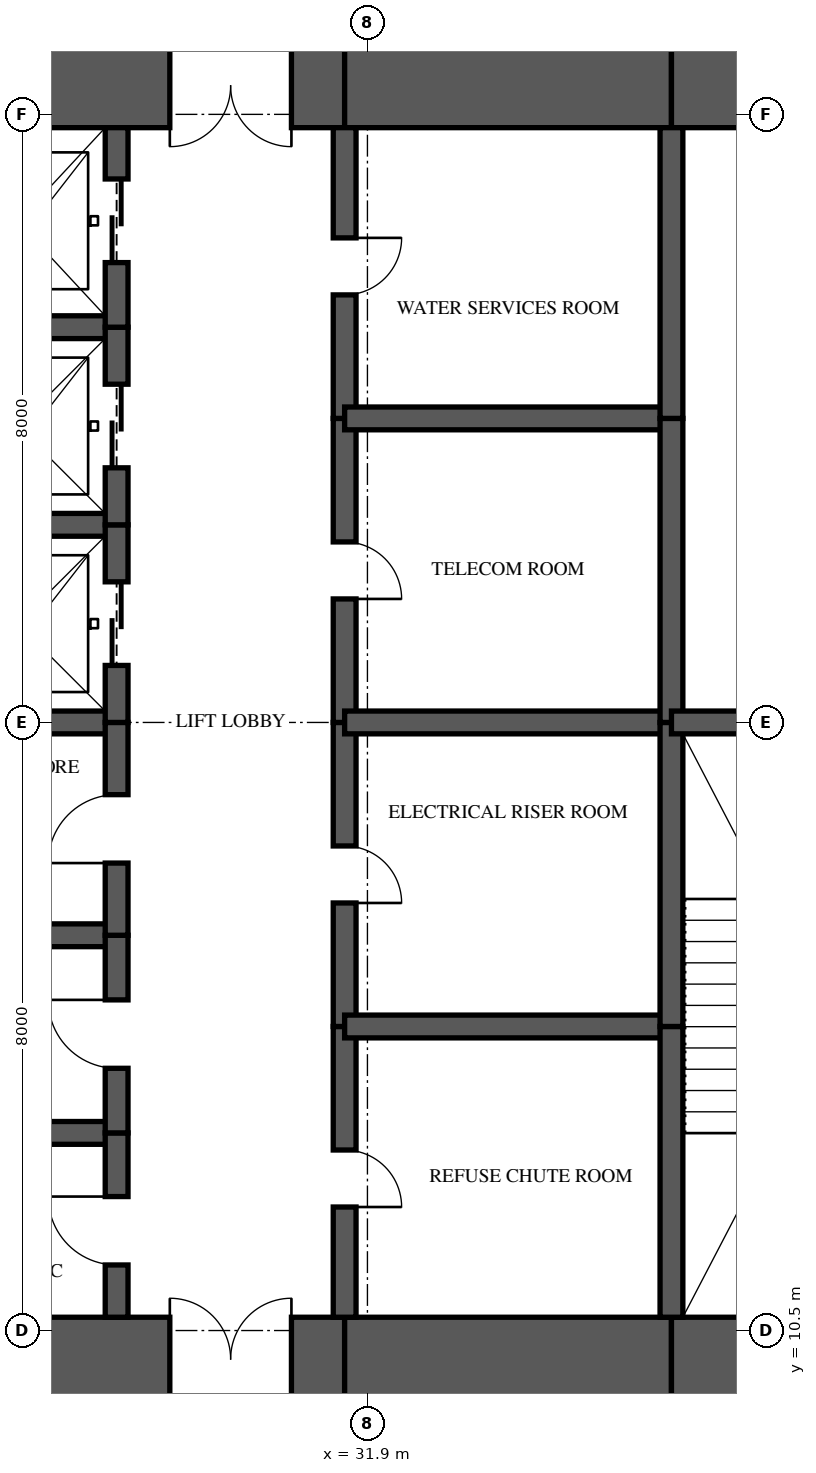
"""IFC4 building model, lengths in metres.
Left out: names, types, materials, properties, quantities, classifications, styles, units other than length and angle.
Written with IfcOpenShell. Run it as: python <this file> out.ifc"""

import sys

from ifc_helpers import new_model, si_unit, direction, frame, frame_2d, origin, place, context, subcontext, project, spatial, rectangle, extrude, element, fill, save


model = new_model("IFC4")
c1 = context("Model", 3, precision=1e-05, world=origin(), true_north=direction((0.0, 1.0)))
c2 = subcontext(c1, "Body", "Model", "MODEL_VIEW")
j1 = project(units=[si_unit("LENGTHUNIT", "METRE"), si_unit("PLANEANGLEUNIT", "RADIAN")], contexts=[c1])
p1 = place(None, origin())
s1 = spatial("IfcSite", under=j1, at=p1, CompositionType="ELEMENT")
p2 = place(p1, origin())
s2 = spatial("IfcBuilding", under=s1, at=p2, CompositionType="ELEMENT")
p3 = place(p2, frame((0.0, 0.0, 256.45)))
s3 = spatial("IfcBuildingStorey", under=s2, at=p3, CompositionType="ELEMENT", Elevation=256.45)
p4 = place(p3, frame((26.0, 10.125, 0.0), z_axis=(0.0, 0.0, 1.0), x_axis=(1.0, 0.0, 0.0)))
e1 = element("IfcWall", 1, at=p4, inside=s3, PredefinedType="SHEAR", context=c2, shape_type="SweptSolid", body=[
    extrude(rectangle(XDim=5.6, YDim=1.1, at=frame_2d((2.8, 0.0))), origin(), (0.0, 0.0, 1.0), 3.5),
])
p5 = place(p4, frame((3.3, 0.0, 0.0)))
e2 = element("IfcOpeningElement", 2, at=p5, cuts=e1, PredefinedType="OPENING", context=c2, shape_type="SweptSolid", body=[
    extrude(rectangle(XDim=1.6, YDim=2.1, at=frame_2d((0.8, 1.05))), frame((0.0, 0.56, 0.0), z_axis=(0.0, -1.0, 0.0), x_axis=(1.0, 0.0, 0.0)), (0.0, 0.0, 1.0), 1.12),
])
p6 = place(p3, frame((31.6, 10.125, 0.0), z_axis=(0.0, 0.0, 1.0), x_axis=(1.0, 0.0, 0.0)))
e3 = element("IfcWall", 3, at=p6, inside=s3, PredefinedType="SHEAR", context=c2, shape_type="SweptSolid", body=[
    extrude(rectangle(XDim=4.3, YDim=1.1, at=frame_2d((2.15, 0.0))), origin(), (0.0, 0.0, 1.0), 3.5),
])
p7 = place(p3, frame((35.9, 10.125, 0.0), z_axis=(0.0, 0.0, 1.0), x_axis=(1.0, 0.0, 0.0)))
e4 = element("IfcWall", 4, at=p7, inside=s3, PredefinedType="SHEAR", context=c2, shape_type="SweptSolid", body=[
    extrude(rectangle(XDim=8.175, YDim=1.1, at=frame_2d((4.087, 0.0))), origin(), (0.0, 0.0, 1.0), 3.5),
])
p8 = place(p7, frame((2.7, 0.0, 0.0)))
e5 = element("IfcOpeningElement", 5, at=p8, cuts=e4, PredefinedType="OPENING", context=c2, shape_type="SweptSolid", body=[
    extrude(rectangle(XDim=1.0, YDim=2.1, at=frame_2d((0.5, 1.05))), frame((0.0, 0.56, 0.0), z_axis=(0.0, -1.0, 0.0), x_axis=(1.0, 0.0, 0.0)), (0.0, 0.0, 1.0), 1.12),
])
p9 = place(p3, frame((44.075, 26.875, 0.0), z_axis=(0.0, 0.0, 1.0), x_axis=(-1.0, 0.0, 0.0)))
e6 = element("IfcWall", 6, at=p9, inside=s3, PredefinedType="SHEAR", context=c2, shape_type="SweptSolid", body=[
    extrude(rectangle(XDim=8.175, YDim=1.1, at=frame_2d((4.087, 0.0))), origin(), (0.0, 0.0, 1.0), 3.5),
])
p10 = place(p9, frame((5.575, 0.0, 0.0)))
e7 = element("IfcOpeningElement", 7, at=p10, cuts=e6, PredefinedType="OPENING", context=c2, shape_type="SweptSolid", body=[
    extrude(rectangle(XDim=0.9, YDim=2.1, at=frame_2d((0.45, 1.05))), frame((0.0, 0.56, 0.0), z_axis=(0.0, -1.0, 0.0), x_axis=(1.0, 0.0, 0.0)), (0.0, 0.0, 1.0), 1.12),
])
p11 = place(p3, frame((35.9, 26.875, 0.0), z_axis=(0.0, 0.0, 1.0), x_axis=(-1.0, 0.0, 0.0)))
e8 = element("IfcWall", 8, at=p11, inside=s3, PredefinedType="SHEAR", context=c2, shape_type="SweptSolid", body=[
    extrude(rectangle(XDim=4.3, YDim=1.1, at=frame_2d((2.15, 0.0))), origin(), (0.0, 0.0, 1.0), 3.5),
])
p12 = place(p3, frame((31.6, 26.875, 0.0), z_axis=(0.0, 0.0, 1.0), x_axis=(-1.0, 0.0, 0.0)))
e9 = element("IfcWall", 9, at=p12, inside=s3, PredefinedType="SHEAR", context=c2, shape_type="SweptSolid", body=[
    extrude(rectangle(XDim=5.6, YDim=1.1, at=frame_2d((2.8, 0.0))), origin(), (0.0, 0.0, 1.0), 3.5),
])
p13 = place(p12, frame((0.7, 0.0, 0.0)))
e10 = element("IfcOpeningElement", 10, at=p13, cuts=e9, PredefinedType="OPENING", context=c2, shape_type="SweptSolid", body=[
    extrude(rectangle(XDim=1.6, YDim=2.1, at=frame_2d((0.8, 1.05))), frame((0.0, 0.56, 0.0), z_axis=(0.0, -1.0, 0.0), x_axis=(1.0, 0.0, 0.0)), (0.0, 0.0, 1.0), 1.12),
])
p14 = place(p3, frame((28.6, 10.675, 0.0), z_axis=(0.0, 0.0, 1.0), x_axis=(0.0, 1.0, 0.0)))
e11 = element("IfcWall", 11, at=p14, inside=s3, PredefinedType="SHEAR", context=c2, shape_type="SweptSolid", body=[
    extrude(rectangle(XDim=2.425, YDim=0.3, at=frame_2d((1.212, 0.0))), origin(), (0.0, 0.0, 1.0), 3.5),
])
p15 = place(p14, frame((0.688, 0.0, 0.0)))
e12 = element("IfcOpeningElement", 12, at=p15, cuts=e11, PredefinedType="OPENING", context=c2, shape_type="SweptSolid", body=[
    extrude(rectangle(XDim=0.9, YDim=2.1, at=frame_2d((0.45, 1.05))), frame((0.0, 0.16, 0.0), z_axis=(0.0, -1.0, 0.0), x_axis=(1.0, 0.0, 0.0)), (0.0, 0.0, 1.0), 0.32),
])
p16 = place(p3, frame((28.6, 13.1, 0.0), z_axis=(0.0, 0.0, 1.0), x_axis=(0.0, 1.0, 0.0)))
e13 = element("IfcWall", 13, at=p16, inside=s3, PredefinedType="SHEAR", context=c2, shape_type="SweptSolid", body=[
    extrude(rectangle(XDim=2.6, YDim=0.3, at=frame_2d((1.3, 0.0))), origin(), (0.0, 0.0, 1.0), 3.5),
])
p17 = place(p16, frame((0.85, 0.0, 0.0)))
e14 = element("IfcOpeningElement", 14, at=p17, cuts=e13, PredefinedType="OPENING", context=c2, shape_type="SweptSolid", body=[
    extrude(rectangle(XDim=0.9, YDim=2.1, at=frame_2d((0.45, 1.05))), frame((0.0, 0.16, 0.0), z_axis=(0.0, -1.0, 0.0), x_axis=(1.0, 0.0, 0.0)), (0.0, 0.0, 1.0), 0.32),
])
p18 = place(p3, frame((28.6, 15.7, 0.0), z_axis=(0.0, 0.0, 1.0), x_axis=(0.0, 1.0, 0.0)))
e15 = element("IfcWall", 15, at=p18, inside=s3, PredefinedType="SHEAR", context=c2, shape_type="SweptSolid", body=[
    extrude(rectangle(XDim=2.8, YDim=0.3, at=frame_2d((1.4, 0.0))), origin(), (0.0, 0.0, 1.0), 3.5),
])
p19 = place(p18, frame((0.95, 0.0, 0.0)))
e16 = element("IfcOpeningElement", 16, at=p19, cuts=e15, PredefinedType="OPENING", context=c2, shape_type="SweptSolid", body=[
    extrude(rectangle(XDim=0.9, YDim=2.1, at=frame_2d((0.45, 1.05))), frame((0.0, 0.16, 0.0), z_axis=(0.0, -1.0, 0.0), x_axis=(1.0, 0.0, 0.0)), (0.0, 0.0, 1.0), 0.32),
])
p20 = place(p3, frame((28.6, 18.5, 0.0), z_axis=(0.0, 0.0, 1.0), x_axis=(0.0, 1.0, 0.0)))
e17 = element("IfcWall", 17, at=p20, inside=s3, PredefinedType="SHEAR", context=c2, shape_type="SweptSolid", body=[
    extrude(rectangle(XDim=2.6, YDim=0.3, at=frame_2d((1.3, 0.0))), origin(), (0.0, 0.0, 1.0), 3.5),
])
p21 = place(p20, frame((0.75, 0.0, 0.0)))
e18 = element("IfcOpeningElement", 18, at=p21, cuts=e17, PredefinedType="OPENING", context=c2, shape_type="SweptSolid", body=[
    extrude(rectangle(XDim=1.1, YDim=2.1, at=frame_2d((0.55, 1.05))), frame((0.0, 0.16, 0.0), z_axis=(0.0, -1.0, 0.0), x_axis=(1.0, 0.0, 0.0)), (0.0, 0.0, 1.0), 0.32),
])
p22 = place(p3, frame((28.6, 21.1, 0.0), z_axis=(0.0, 0.0, 1.0), x_axis=(0.0, 1.0, 0.0)))
e19 = element("IfcWall", 19, at=p22, inside=s3, PredefinedType="SHEAR", context=c2, shape_type="SweptSolid", body=[
    extrude(rectangle(XDim=2.6, YDim=0.3, at=frame_2d((1.3, 0.0))), origin(), (0.0, 0.0, 1.0), 3.5),
])
p23 = place(p22, frame((0.75, 0.0, 0.0)))
e20 = element("IfcOpeningElement", 20, at=p23, cuts=e19, PredefinedType="OPENING", context=c2, shape_type="SweptSolid", body=[
    extrude(rectangle(XDim=1.1, YDim=2.1, at=frame_2d((0.55, 1.05))), frame((0.0, 0.16, 0.0), z_axis=(0.0, -1.0, 0.0), x_axis=(1.0, 0.0, 0.0)), (0.0, 0.0, 1.0), 0.32),
])
p24 = place(p3, frame((28.6, 23.7, 0.0), z_axis=(0.0, 0.0, 1.0), x_axis=(0.0, 1.0, 0.0)))
e21 = element("IfcWall", 21, at=p24, inside=s3, PredefinedType="SHEAR", context=c2, shape_type="SweptSolid", body=[
    extrude(rectangle(XDim=2.625, YDim=0.3, at=frame_2d((1.312, 0.0))), origin(), (0.0, 0.0, 1.0), 3.5),
])
p25 = place(p24, frame((0.85, 0.0, 0.0)))
e22 = element("IfcOpeningElement", 22, at=p25, cuts=e21, PredefinedType="OPENING", context=c2, shape_type="SweptSolid", body=[
    extrude(rectangle(XDim=1.1, YDim=2.1, at=frame_2d((0.55, 1.05))), frame((0.0, 0.16, 0.0), z_axis=(0.0, -1.0, 0.0), x_axis=(1.0, 0.0, 0.0)), (0.0, 0.0, 1.0), 0.32),
])
p26 = place(p3, frame((31.6, 10.675, 0.0), z_axis=(0.0, 0.0, 1.0), x_axis=(0.0, 1.0, 0.0)))
e23 = element("IfcWall", 23, at=p26, inside=s3, PredefinedType="SHEAR", context=c2, shape_type="SweptSolid", body=[
    extrude(rectangle(XDim=3.825, YDim=0.3, at=frame_2d((1.913, 0.0))), origin(), (0.0, 0.0, 1.0), 3.5),
])
p27 = place(p26, frame((1.45, 0.0, 0.0)))
e24 = element("IfcOpeningElement", 24, at=p27, cuts=e23, PredefinedType="OPENING", context=c2, shape_type="SweptSolid", body=[
    extrude(rectangle(XDim=0.75, YDim=2.1, at=frame_2d((0.375, 1.05))), frame((0.0, 0.16, 0.0), z_axis=(0.0, -1.0, 0.0), x_axis=(1.0, 0.0, 0.0)), (0.0, 0.0, 1.0), 0.32),
])
p28 = place(p3, frame((31.6, 14.5, 0.0), z_axis=(0.0, 0.0, 1.0), x_axis=(0.0, 1.0, 0.0)))
e25 = element("IfcWall", 25, at=p28, inside=s3, PredefinedType="SHEAR", context=c2, shape_type="SweptSolid", body=[
    extrude(rectangle(XDim=4.0, YDim=0.3, at=frame_2d((2.0, 0.0))), origin(), (0.0, 0.0, 1.0), 3.5),
])
p29 = place(p28, frame((1.625, 0.0, 0.0)))
e26 = element("IfcOpeningElement", 26, at=p29, cuts=e25, PredefinedType="OPENING", context=c2, shape_type="SweptSolid", body=[
    extrude(rectangle(XDim=0.75, YDim=2.1, at=frame_2d((0.375, 1.05))), frame((0.0, 0.16, 0.0), z_axis=(0.0, -1.0, 0.0), x_axis=(1.0, 0.0, 0.0)), (0.0, 0.0, 1.0), 0.32),
])
p30 = place(p3, frame((31.6, 18.5, 0.0), z_axis=(0.0, 0.0, 1.0), x_axis=(0.0, 1.0, 0.0)))
e27 = element("IfcWall", 27, at=p30, inside=s3, PredefinedType="SHEAR", context=c2, shape_type="SweptSolid", body=[
    extrude(rectangle(XDim=4.0, YDim=0.3, at=frame_2d((2.0, 0.0))), origin(), (0.0, 0.0, 1.0), 3.5),
])
p31 = place(p30, frame((1.625, 0.0, 0.0)))
e28 = element("IfcOpeningElement", 28, at=p31, cuts=e27, PredefinedType="OPENING", context=c2, shape_type="SweptSolid", body=[
    extrude(rectangle(XDim=0.75, YDim=2.1, at=frame_2d((0.375, 1.05))), frame((0.0, 0.16, 0.0), z_axis=(0.0, -1.0, 0.0), x_axis=(1.0, 0.0, 0.0)), (0.0, 0.0, 1.0), 0.32),
])
p32 = place(p3, frame((31.6, 22.5, 0.0), z_axis=(0.0, 0.0, 1.0), x_axis=(0.0, 1.0, 0.0)))
e29 = element("IfcWall", 29, at=p32, inside=s3, PredefinedType="SHEAR", context=c2, shape_type="SweptSolid", body=[
    extrude(rectangle(XDim=3.825, YDim=0.3, at=frame_2d((1.913, 0.0))), origin(), (0.0, 0.0, 1.0), 3.5),
])
p33 = place(p32, frame((1.625, 0.0, 0.0)))
e30 = element("IfcOpeningElement", 30, at=p33, cuts=e29, PredefinedType="OPENING", context=c2, shape_type="SweptSolid", body=[
    extrude(rectangle(XDim=0.75, YDim=2.1, at=frame_2d((0.375, 1.05))), frame((0.0, 0.16, 0.0), z_axis=(0.0, -1.0, 0.0), x_axis=(1.0, 0.0, 0.0)), (0.0, 0.0, 1.0), 0.32),
])
p34 = place(p3, frame((35.9, 10.675, 0.0), z_axis=(0.0, 0.0, 1.0), x_axis=(0.0, 1.0, 0.0)))
e31 = element("IfcWall", 31, at=p34, inside=s3, PredefinedType="SHEAR", context=c2, shape_type="SweptSolid", body=[
    extrude(rectangle(XDim=3.825, YDim=0.3, at=frame_2d((1.913, 0.0))), origin(), (0.0, 0.0, 1.0), 3.5),
])
for number, where, z_axis, x_axis in (
    (32, (35.9, 14.5, 0.0), (0.0, 0.0, 1.0), (0.0, 1.0, 0.0)),
    (33, (35.9, 18.5, 0.0), (0.0, 0.0, 1.0), (0.0, 1.0, 0.0)),
):
    element("IfcWall", number, at=place(p3, frame(where, z_axis=z_axis, x_axis=x_axis)), inside=s3, PredefinedType="SHEAR", context=c2, shape_type="SweptSolid", body=[
        extrude(rectangle(XDim=4.0, YDim=0.3, at=frame_2d((2.0, 0.0))), origin(), (0.0, 0.0, 1.0), 3.5),
    ])
p35 = place(p3, frame((35.9, 22.5, 0.0), z_axis=(0.0, 0.0, 1.0), x_axis=(0.0, 1.0, 0.0)))
e34 = element("IfcWall", 34, at=p35, inside=s3, PredefinedType="SHEAR", context=c2, shape_type="SweptSolid", body=[
    extrude(rectangle(XDim=3.825, YDim=0.3, at=frame_2d((1.913, 0.0))), origin(), (0.0, 0.0, 1.0), 3.5),
])
for number, where, z_axis, x_axis in (
    (35, (26.0, 13.1, 0.0), (0.0, 0.0, 1.0), (1.0, 0.0, 0.0)),
    (36, (26.0, 15.7, 0.0), (0.0, 0.0, 1.0), (1.0, 0.0, 0.0)),
    (37, (26.0, 18.5, 0.0), (0.0, 0.0, 1.0), (1.0, 0.0, 0.0)),
    (38, (26.0, 21.1, 0.0), (0.0, 0.0, 1.0), (1.0, 0.0, 0.0)),
    (39, (26.0, 23.7, 0.0), (0.0, 0.0, 1.0), (1.0, 0.0, 0.0)),
):
    element("IfcWall", number, at=place(p3, frame(where, z_axis=z_axis, x_axis=x_axis)), inside=s3, PredefinedType="SHEAR", context=c2, shape_type="SweptSolid", body=[
        extrude(rectangle(XDim=2.6, YDim=0.3, at=frame_2d((1.3, 0.0))), origin(), (0.0, 0.0, 1.0), 3.5),
    ])
for number, where, z_axis, x_axis in (
    (40, (31.6, 14.5, 0.0), (0.0, 0.0, 1.0), (1.0, 0.0, 0.0)),
    (41, (31.6, 18.5, 0.0), (0.0, 0.0, 1.0), (1.0, 0.0, 0.0)),
    (42, (31.6, 22.5, 0.0), (0.0, 0.0, 1.0), (1.0, 0.0, 0.0)),
):
    element("IfcWall", number, at=place(p3, frame(where, z_axis=z_axis, x_axis=x_axis)), inside=s3, PredefinedType="SHEAR", context=c2, shape_type="SweptSolid", body=[
        extrude(rectangle(XDim=4.3, YDim=0.3, at=frame_2d((2.15, 0.0))), origin(), (0.0, 0.0, 1.0), 3.5),
    ])
p36 = place(p3, frame((35.9, 18.5, 0.0), z_axis=(0.0, 0.0, 1.0), x_axis=(1.0, 0.0, 0.0)))
e43 = element("IfcWall", 43, at=p36, inside=s3, PredefinedType="SHEAR", context=c2, shape_type="SweptSolid", body=[
    extrude(rectangle(XDim=4.3, YDim=0.3, at=frame_2d((2.15, 0.0))), origin(), (0.0, 0.0, 1.0), 3.5),
])
p37 = place(p21, origin())
e44 = element("IfcDoor", 44, at=p37, inside=s3, OperationType="SLIDING_TO_LEFT", PredefinedType="DOOR", context=c2, shape_type="SweptSolid", body=[
    extrude(rectangle(XDim=1.1, YDim=2.1, at=frame_2d((0.55, 1.05))), frame((0.0, 0.025, 0.0), z_axis=(0.0, -1.0, 0.0), x_axis=(1.0, 0.0, 0.0)), (0.0, 0.0, 1.0), 0.05),
])
fill(e18, e44)
p38 = place(p23, origin())
e45 = element("IfcDoor", 45, at=p38, inside=s3, OperationType="SLIDING_TO_LEFT", PredefinedType="DOOR", context=c2, shape_type="SweptSolid", body=[
    extrude(rectangle(XDim=1.1, YDim=2.1, at=frame_2d((0.55, 1.05))), frame((0.0, 0.025, 0.0), z_axis=(0.0, -1.0, 0.0), x_axis=(1.0, 0.0, 0.0)), (0.0, 0.0, 1.0), 0.05),
])
fill(e20, e45)
p39 = place(p25, origin())
e46 = element("IfcDoor", 46, at=p39, inside=s3, OperationType="SLIDING_TO_LEFT", PredefinedType="DOOR", context=c2, shape_type="SweptSolid", body=[
    extrude(rectangle(XDim=1.1, YDim=2.1, at=frame_2d((0.55, 1.05))), frame((0.0, 0.025, 0.0), z_axis=(0.0, -1.0, 0.0), x_axis=(1.0, 0.0, 0.0)), (0.0, 0.0, 1.0), 0.05),
])
fill(e22, e46)
p40 = place(p15, origin())
e47 = element("IfcDoor", 47, at=p40, inside=s3, OperationType="SINGLE_SWING_RIGHT", PredefinedType="DOOR", context=c2, shape_type="SweptSolid", body=[
    extrude(rectangle(XDim=0.9, YDim=2.1, at=frame_2d((0.45, 1.05))), frame((0.0, 0.025, 0.0), z_axis=(0.0, -1.0, 0.0), x_axis=(1.0, 0.0, 0.0)), (0.0, 0.0, 1.0), 0.05),
])
fill(e12, e47)
p41 = place(p17, origin())
e48 = element("IfcDoor", 48, at=p41, inside=s3, OperationType="SINGLE_SWING_RIGHT", PredefinedType="DOOR", context=c2, shape_type="SweptSolid", body=[
    extrude(rectangle(XDim=0.9, YDim=2.1, at=frame_2d((0.45, 1.05))), frame((0.0, 0.025, 0.0), z_axis=(0.0, -1.0, 0.0), x_axis=(1.0, 0.0, 0.0)), (0.0, 0.0, 1.0), 0.05),
])
fill(e14, e48)
p42 = place(p19, origin())
e49 = element("IfcDoor", 49, at=p42, inside=s3, OperationType="SINGLE_SWING_LEFT", PredefinedType="DOOR", context=c2, shape_type="SweptSolid", body=[
    extrude(rectangle(XDim=0.9, YDim=2.1, at=frame_2d((0.45, 1.05))), frame((0.0, 0.025, 0.0), z_axis=(0.0, -1.0, 0.0), x_axis=(1.0, 0.0, 0.0)), (0.0, 0.0, 1.0), 0.05),
])
fill(e16, e49)
p43 = place(p5, origin())
e50 = element("IfcDoor", 50, at=p43, inside=s3, OperationType="DOUBLE_DOOR_SINGLE_SWING", PredefinedType="DOOR", context=c2, shape_type="SweptSolid", body=[
    extrude(rectangle(XDim=1.6, YDim=2.1, at=frame_2d((0.8, 1.05))), frame((0.0, 0.025, 0.0), z_axis=(0.0, -1.0, 0.0), x_axis=(1.0, 0.0, 0.0)), (0.0, 0.0, 1.0), 0.05),
])
fill(e2, e50)
p44 = place(p13, origin())
e51 = element("IfcDoor", 51, at=p44, inside=s3, OperationType="DOUBLE_DOOR_SINGLE_SWING", PredefinedType="DOOR", context=c2, shape_type="SweptSolid", body=[
    extrude(rectangle(XDim=1.6, YDim=2.1, at=frame_2d((0.8, 1.05))), frame((0.0, 0.025, 0.0), z_axis=(0.0, -1.0, 0.0), x_axis=(1.0, 0.0, 0.0)), (0.0, 0.0, 1.0), 0.05),
])
fill(e10, e51)
p45 = place(p27, frame((0.75, 0.0, 0.0), z_axis=(0.0, 0.0, 1.0), x_axis=(-1.0, 0.0, 0.0)))
e52 = element("IfcDoor", 52, at=p45, inside=s3, OperationType="SINGLE_SWING_RIGHT", PredefinedType="DOOR", context=c2, shape_type="SweptSolid", body=[
    extrude(rectangle(XDim=0.75, YDim=2.1, at=frame_2d((0.375, 1.05))), frame((0.0, 0.025, 0.0), z_axis=(0.0, -1.0, 0.0), x_axis=(1.0, 0.0, 0.0)), (0.0, 0.0, 1.0), 0.05),
])
fill(e24, e52)
p46 = place(p29, frame((0.75, 0.0, 0.0), z_axis=(0.0, 0.0, 1.0), x_axis=(-1.0, 0.0, 0.0)))
e53 = element("IfcDoor", 53, at=p46, inside=s3, OperationType="SINGLE_SWING_RIGHT", PredefinedType="DOOR", context=c2, shape_type="SweptSolid", body=[
    extrude(rectangle(XDim=0.75, YDim=2.1, at=frame_2d((0.375, 1.05))), frame((0.0, 0.025, 0.0), z_axis=(0.0, -1.0, 0.0), x_axis=(1.0, 0.0, 0.0)), (0.0, 0.0, 1.0), 0.05),
])
fill(e26, e53)
p47 = place(p31, frame((0.75, 0.0, 0.0), z_axis=(0.0, 0.0, 1.0), x_axis=(-1.0, 0.0, 0.0)))
e54 = element("IfcDoor", 54, at=p47, inside=s3, OperationType="SINGLE_SWING_RIGHT", PredefinedType="DOOR", context=c2, shape_type="SweptSolid", body=[
    extrude(rectangle(XDim=0.75, YDim=2.1, at=frame_2d((0.375, 1.05))), frame((0.0, 0.025, 0.0), z_axis=(0.0, -1.0, 0.0), x_axis=(1.0, 0.0, 0.0)), (0.0, 0.0, 1.0), 0.05),
])
fill(e28, e54)
p48 = place(p33, frame((0.75, 0.0, 0.0), z_axis=(0.0, 0.0, 1.0), x_axis=(-1.0, 0.0, 0.0)))
e55 = element("IfcDoor", 55, at=p48, inside=s3, OperationType="SINGLE_SWING_LEFT", PredefinedType="DOOR", context=c2, shape_type="SweptSolid", body=[
    extrude(rectangle(XDim=0.75, YDim=2.1, at=frame_2d((0.375, 1.05))), frame((0.0, 0.025, 0.0), z_axis=(0.0, -1.0, 0.0), x_axis=(1.0, 0.0, 0.0)), (0.0, 0.0, 1.0), 0.05),
])
fill(e30, e55)
save(model, sys.argv[1])
